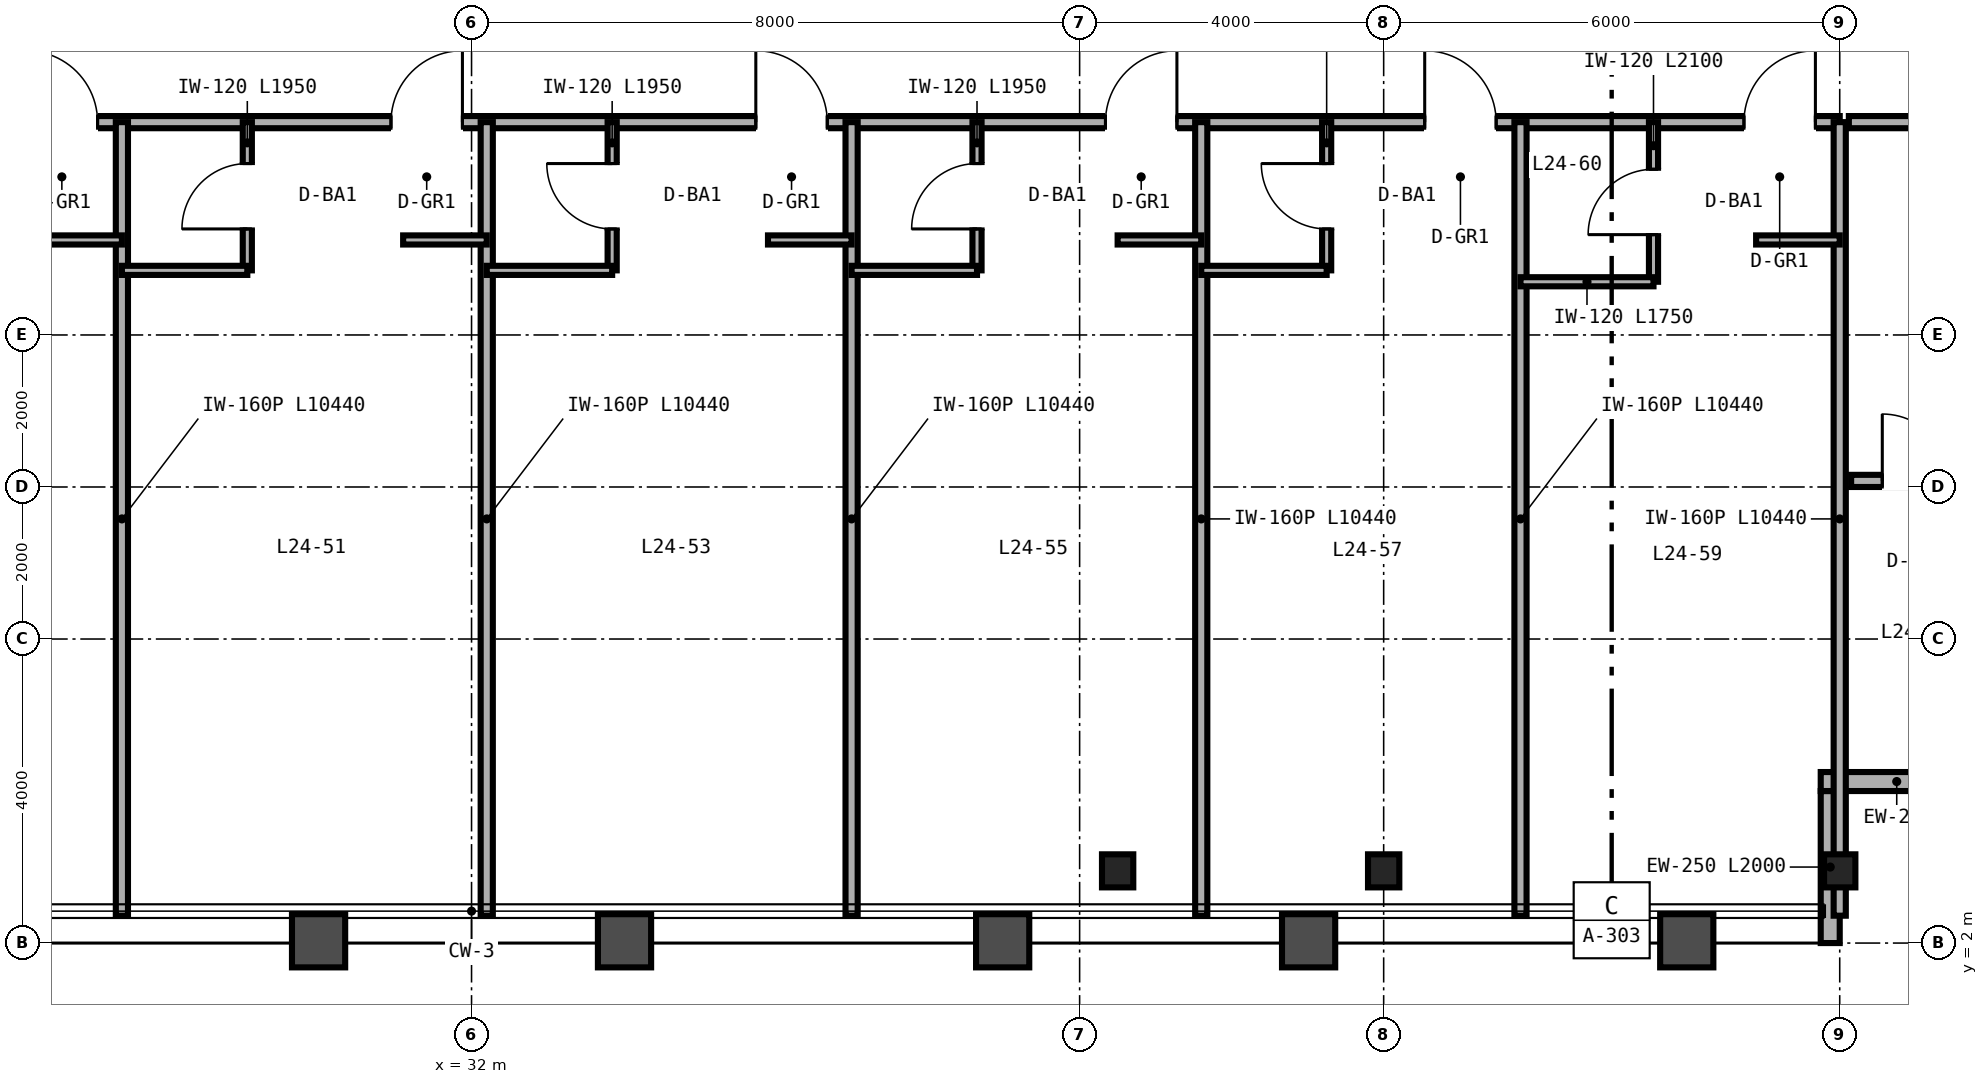
"""IFC4 building model, lengths in metres.
Left out: names, types, materials, properties, quantities, classifications, styles, units other than length and angle.
Written with IfcOpenShell. Run it as: python <this file> out.ifc"""

import sys

from ifc_helpers import new_model, si_unit, direction, frame, frame_2d, origin, origin_2d, place, context, subcontext, project, spatial, rectangle, i_section, extrude, source, transform, mapped, element, fill, save


model = new_model("IFC4")
c1 = context("Model", 3, precision=1e-05, world=origin(), true_north=direction((0.0, 1.0)))
c2 = subcontext(c1, "Body", "Model", "MODEL_VIEW")
j1 = project(units=[si_unit("LENGTHUNIT", "METRE"), si_unit("PLANEANGLEUNIT", "RADIAN")], contexts=[c1])
p1 = place(None, origin())
s1 = spatial("IfcSite", under=j1, at=p1, CompositionType="ELEMENT")
p2 = place(p1, origin())
s2 = spatial("IfcBuilding", under=s1, at=p2, CompositionType="ELEMENT")
p3 = place(p2, frame((0.0, 0.0, 100.8)))
s3 = spatial("IfcBuildingStorey", under=s2, at=p3, CompositionType="ELEMENT", Elevation=100.8)
m1 = source(origin(), c2, "Body", "SweptSolid", [
    extrude(i_section(OverallWidth=0.412, OverallDepth=0.435, WebThickness=0.036, FlangeThickness=0.057, FilletRadius=0.025, at=origin_2d()), origin(), (0.0, 0.0, 1.0), 3.36),
])
for number, where, z_axis, x_axis in (
    (1, (40.5, 2.95, 0.0), (0.0, 0.0, 1.0), (1.0, 0.0, 0.0)),
    (2, (44.0, 2.95, 0.0), (0.0, 0.0, 1.0), (1.0, 0.0, 0.0)),
    (3, (50.0, 2.95, 0.0), (0.0, 0.0, 1.0), (1.0, 0.0, 0.0)),
):
    element("IfcColumn", number, at=place(p3, frame(where, z_axis=z_axis, x_axis=x_axis)), inside=s3, PredefinedType="COLUMN", context=c2, shape_type="MappedRepresentation", body=[
        mapped(m1, transform((0.0, 0.0, 0.0), scale=1.0)),
    ])
p4 = place(p3, frame((49.875, 2.0, 0.0), z_axis=(0.0, 0.0, 1.0), x_axis=(0.0, 1.0, 0.0)))
e4 = element("IfcWall", 4, at=p4, inside=s3, PredefinedType="SOLIDWALL", context=c2, shape_type="SweptSolid", body=[
    extrude(rectangle(XDim=2.0, YDim=0.25, at=frame_2d((1.0, 0.0))), origin(), (0.0, 0.0, 1.0), 2.667),
])
p5 = place(p3, frame((49.75, 4.125, 0.0), z_axis=(0.0, 0.0, 1.0), x_axis=(1.0, 0.0, 0.0)))
e5 = element("IfcWall", 5, at=p5, inside=s3, PredefinedType="SOLIDWALL", context=c2, shape_type="SweptSolid", body=[
    extrude(rectangle(XDim=2.0, YDim=0.25, at=frame_2d((1.0, 0.0))), origin(), (0.0, 0.0, 1.0), 3.36),
])
p6 = place(p3, frame((50.12, 12.8, 0.0), z_axis=(0.0, 0.0, 1.0), x_axis=(1.0, 0.0, 0.0)))
e6 = element("IfcWall", 6, at=p6, inside=s3, PredefinedType="PARTITIONING", context=c2, shape_type="SweptSolid", body=[
    extrude(rectangle(XDim=5.68, YDim=0.16, at=frame_2d((2.84, 0.0))), origin(), (0.0, 0.0, 1.0), 3.36),
])
p7 = place(p6, frame((2.36, 0.0, 0.0)))
e7 = element("IfcOpeningElement", 7, at=p7, cuts=e6, PredefinedType="OPENING", context=c2, shape_type="SweptSolid", body=[
    extrude(rectangle(XDim=0.96, YDim=2.15, at=frame_2d((0.48, 1.075))), frame((0.0, 0.09, 0.0), z_axis=(0.0, -1.0, 0.0), x_axis=(1.0, 0.0, 0.0)), (0.0, 0.0, 1.0), 0.18),
])
p8 = place(p3, frame((50.15, 8.08, 0.0), z_axis=(0.0, 0.0, 1.0), x_axis=(1.0, 0.0, 0.0)))
e8 = element("IfcWall", 8, at=p8, inside=s3, PredefinedType="PARTITIONING", context=c2, shape_type="SweptSolid", body=[
    extrude(rectangle(XDim=1.7, YDim=0.16, at=frame_2d((0.85, 0.0))), origin(), (0.0, 0.0, 1.0), 3.36),
])
p9 = place(p8, frame((0.41, 0.0, 0.0)))
e9 = element("IfcOpeningElement", 9, at=p9, cuts=e8, PredefinedType="OPENING", context=c2, shape_type="SweptSolid", body=[
    extrude(rectangle(XDim=0.88, YDim=2.15, at=frame_2d((0.44, 1.075))), frame((0.0, 0.09, 0.0), z_axis=(0.0, -1.0, 0.0), x_axis=(1.0, 0.0, 0.0)), (0.0, 0.0, 1.0), 0.18),
])
p10 = place(p3, frame((14.0, 12.8, 0.0), z_axis=(0.0, 0.0, 1.0), x_axis=(1.0, 0.0, 0.0)))
e10 = element("IfcWall", 10, at=p10, inside=s3, PredefinedType="PARTITIONING", context=c2, shape_type="SweptSolid", body=[
    extrude(rectangle(XDim=36.0, YDim=0.16, at=frame_2d((18.0, 0.0))), origin(), (0.0, 0.0, 1.0), 2.581),
])
p11 = place(p10, frame((3.14, 0.0, 0.0)))
e11 = element("IfcOpeningElement", 11, at=p11, cuts=e10, PredefinedType="OPENING", context=c2, shape_type="SweptSolid", body=[
    extrude(rectangle(XDim=0.94, YDim=2.15, at=frame_2d((0.47, 1.075))), frame((0.0, 0.09, 0.0), z_axis=(0.0, -1.0, 0.0), x_axis=(1.0, 0.0, 0.0)), (0.0, 0.0, 1.0), 0.18),
])
p12 = place(p10, frame((7.54, 0.0, 0.0)))
e12 = element("IfcOpeningElement", 12, at=p12, cuts=e10, PredefinedType="OPENING", context=c2, shape_type="SweptSolid", body=[
    extrude(rectangle(XDim=0.94, YDim=2.15, at=frame_2d((0.47, 1.075))), frame((0.0, 0.09, 0.0), z_axis=(0.0, -1.0, 0.0), x_axis=(1.0, 0.0, 0.0)), (0.0, 0.0, 1.0), 0.18),
])
p13 = place(p10, frame((12.14, 0.0, 0.0)))
e13 = element("IfcOpeningElement", 13, at=p13, cuts=e10, PredefinedType="OPENING", context=c2, shape_type="SweptSolid", body=[
    extrude(rectangle(XDim=0.94, YDim=2.15, at=frame_2d((0.47, 1.075))), frame((0.0, 0.09, 0.0), z_axis=(0.0, -1.0, 0.0), x_axis=(1.0, 0.0, 0.0)), (0.0, 0.0, 1.0), 0.18),
])
p14 = place(p10, frame((16.94, 0.0, 0.0)))
e14 = element("IfcOpeningElement", 14, at=p14, cuts=e10, PredefinedType="OPENING", context=c2, shape_type="SweptSolid", body=[
    extrude(rectangle(XDim=0.94, YDim=2.15, at=frame_2d((0.47, 1.075))), frame((0.0, 0.09, 0.0), z_axis=(0.0, -1.0, 0.0), x_axis=(1.0, 0.0, 0.0)), (0.0, 0.0, 1.0), 0.18),
])
p15 = place(p10, frame((21.74, 0.0, 0.0)))
e15 = element("IfcOpeningElement", 15, at=p15, cuts=e10, PredefinedType="OPENING", context=c2, shape_type="SweptSolid", body=[
    extrude(rectangle(XDim=0.94, YDim=2.15, at=frame_2d((0.47, 1.075))), frame((0.0, 0.09, 0.0), z_axis=(0.0, -1.0, 0.0), x_axis=(1.0, 0.0, 0.0)), (0.0, 0.0, 1.0), 0.18),
])
p16 = place(p10, frame((26.34, 0.0, 0.0)))
e16 = element("IfcOpeningElement", 16, at=p16, cuts=e10, PredefinedType="OPENING", context=c2, shape_type="SweptSolid", body=[
    extrude(rectangle(XDim=0.94, YDim=2.15, at=frame_2d((0.47, 1.075))), frame((0.0, 0.09, 0.0), z_axis=(0.0, -1.0, 0.0), x_axis=(1.0, 0.0, 0.0)), (0.0, 0.0, 1.0), 0.18),
])
p17 = place(p10, frame((30.54, 0.0, 0.0)))
e17 = element("IfcOpeningElement", 17, at=p17, cuts=e10, PredefinedType="OPENING", context=c2, shape_type="SweptSolid", body=[
    extrude(rectangle(XDim=0.94, YDim=2.15, at=frame_2d((0.47, 1.075))), frame((0.0, 0.09, 0.0), z_axis=(0.0, -1.0, 0.0), x_axis=(1.0, 0.0, 0.0)), (0.0, 0.0, 1.0), 0.18),
])
p18 = place(p10, frame((34.74, 0.0, 0.0)))
e18 = element("IfcOpeningElement", 18, at=p18, cuts=e10, PredefinedType="OPENING", context=c2, shape_type="SweptSolid", body=[
    extrude(rectangle(XDim=0.94, YDim=2.15, at=frame_2d((0.47, 1.075))), frame((0.0, 0.09, 0.0), z_axis=(0.0, -1.0, 0.0), x_axis=(1.0, 0.0, 0.0)), (0.0, 0.0, 1.0), 0.18),
])
p19 = place(p3, frame((50.0, 2.36, 0.0), z_axis=(0.0, 0.0, 1.0), x_axis=(0.0, 1.0, 0.0)))
e19 = element("IfcWall", 19, at=p19, inside=s3, PredefinedType="PARTITIONING", context=c2, shape_type="SweptSolid", body=[
    extrude(rectangle(XDim=10.44, YDim=0.16, at=frame_2d((5.22, 0.0))), origin(), (0.0, 0.0, 1.0), 2.667),
])
p20 = place(p3, frame((27.4, 2.36, 0.0), z_axis=(0.0, 0.0, 1.0), x_axis=(0.0, 1.0, 0.0)))
e20 = element("IfcWall", 20, at=p20, inside=s3, PredefinedType="PARTITIONING", context=c2, shape_type="SweptSolid", body=[
    extrude(rectangle(XDim=10.44, YDim=0.16, at=frame_2d((5.22, 0.0))), origin(), (0.0, 0.0, 1.0), 2.433),
])
p21 = place(p3, frame((26.3, 11.25, 0.0), z_axis=(0.0, 0.0, 1.0), x_axis=(1.0, 0.0, 0.0)))
e21 = element("IfcWall", 21, at=p21, inside=s3, PredefinedType="PARTITIONING", context=c2, shape_type="SweptSolid", body=[
    extrude(rectangle(XDim=1.1, YDim=0.12, at=frame_2d((0.55, 0.0))), origin(), (0.0, 0.0, 1.0), 3.36),
])
p22 = place(p3, frame((32.2, 2.36, 0.0), z_axis=(0.0, 0.0, 1.0), x_axis=(0.0, 1.0, 0.0)))
e22 = element("IfcWall", 22, at=p22, inside=s3, PredefinedType="PARTITIONING", context=c2, shape_type="SweptSolid", body=[
    extrude(rectangle(XDim=10.44, YDim=0.16, at=frame_2d((5.22, 0.0))), origin(), (0.0, 0.0, 1.0), 2.433),
])
p23 = place(p3, frame((29.05, 10.85, 0.0), z_axis=(0.0, 0.0, 1.0), x_axis=(0.0, 1.0, 0.0)))
e23 = element("IfcWall", 23, at=p23, inside=s3, PredefinedType="PARTITIONING", context=c2, shape_type="SweptSolid", body=[
    extrude(rectangle(XDim=1.95, YDim=0.12, at=frame_2d((0.975, 0.0))), origin(), (0.0, 0.0, 1.0), 3.36),
])
p24 = place(p23, frame((0.545, 0.0, 0.0)))
e24 = element("IfcOpeningElement", 24, at=p24, cuts=e23, PredefinedType="OPENING", context=c2, shape_type="SweptSolid", body=[
    extrude(rectangle(XDim=0.86, YDim=2.1, at=frame_2d((0.43, 1.05))), frame((0.0, 0.07, 0.0), z_axis=(0.0, -1.0, 0.0), x_axis=(1.0, 0.0, 0.0)), (0.0, 0.0, 1.0), 0.14),
])
p25 = place(p3, frame((27.4, 10.85, 0.0), z_axis=(0.0, 0.0, 1.0), x_axis=(1.0, 0.0, 0.0)))
e25 = element("IfcWall", 25, at=p25, inside=s3, PredefinedType="PARTITIONING", context=c2, shape_type="SweptSolid", body=[
    extrude(rectangle(XDim=1.65, YDim=0.12, at=frame_2d((0.825, 0.0))), origin(), (0.0, 0.0, 1.0), 3.36),
])
p26 = place(p3, frame((31.1, 11.25, 0.0), z_axis=(0.0, 0.0, 1.0), x_axis=(1.0, 0.0, 0.0)))
e26 = element("IfcWall", 26, at=p26, inside=s3, PredefinedType="PARTITIONING", context=c2, shape_type="SweptSolid", body=[
    extrude(rectangle(XDim=1.1, YDim=0.12, at=frame_2d((0.55, 0.0))), origin(), (0.0, 0.0, 1.0), 3.36),
])
p27 = place(p3, frame((37.0, 2.36, 0.0), z_axis=(0.0, 0.0, 1.0), x_axis=(0.0, 1.0, 0.0)))
e27 = element("IfcWall", 27, at=p27, inside=s3, PredefinedType="PARTITIONING", context=c2, shape_type="SweptSolid", body=[
    extrude(rectangle(XDim=10.44, YDim=0.16, at=frame_2d((5.22, 0.0))), origin(), (0.0, 0.0, 1.0), 2.433),
])
p28 = place(p3, frame((33.85, 10.85, 0.0), z_axis=(0.0, 0.0, 1.0), x_axis=(0.0, 1.0, 0.0)))
e28 = element("IfcWall", 28, at=p28, inside=s3, PredefinedType="PARTITIONING", context=c2, shape_type="SweptSolid", body=[
    extrude(rectangle(XDim=1.95, YDim=0.12, at=frame_2d((0.975, 0.0))), origin(), (0.0, 0.0, 1.0), 3.36),
])
p29 = place(p28, frame((0.545, 0.0, 0.0)))
e29 = element("IfcOpeningElement", 29, at=p29, cuts=e28, PredefinedType="OPENING", context=c2, shape_type="SweptSolid", body=[
    extrude(rectangle(XDim=0.86, YDim=2.1, at=frame_2d((0.43, 1.05))), frame((0.0, 0.07, 0.0), z_axis=(0.0, -1.0, 0.0), x_axis=(1.0, 0.0, 0.0)), (0.0, 0.0, 1.0), 0.14),
])
p30 = place(p3, frame((32.2, 10.85, 0.0), z_axis=(0.0, 0.0, 1.0), x_axis=(1.0, 0.0, 0.0)))
e30 = element("IfcWall", 30, at=p30, inside=s3, PredefinedType="PARTITIONING", context=c2, shape_type="SweptSolid", body=[
    extrude(rectangle(XDim=1.65, YDim=0.12, at=frame_2d((0.825, 0.0))), origin(), (0.0, 0.0, 1.0), 3.36),
])
p31 = place(p3, frame((35.9, 11.25, 0.0), z_axis=(0.0, 0.0, 1.0), x_axis=(1.0, 0.0, 0.0)))
e31 = element("IfcWall", 31, at=p31, inside=s3, PredefinedType="PARTITIONING", context=c2, shape_type="SweptSolid", body=[
    extrude(rectangle(XDim=1.1, YDim=0.12, at=frame_2d((0.55, 0.0))), origin(), (0.0, 0.0, 1.0), 3.36),
])
p32 = place(p3, frame((41.6, 2.36, 0.0), z_axis=(0.0, 0.0, 1.0), x_axis=(0.0, 1.0, 0.0)))
e32 = element("IfcWall", 32, at=p32, inside=s3, PredefinedType="PARTITIONING", context=c2, shape_type="SweptSolid", body=[
    extrude(rectangle(XDim=10.44, YDim=0.16, at=frame_2d((5.22, 0.0))), origin(), (0.0, 0.0, 1.0), 2.823),
])
p33 = place(p3, frame((38.65, 10.85, 0.0), z_axis=(0.0, 0.0, 1.0), x_axis=(0.0, 1.0, 0.0)))
e33 = element("IfcWall", 33, at=p33, inside=s3, PredefinedType="PARTITIONING", context=c2, shape_type="SweptSolid", body=[
    extrude(rectangle(XDim=1.95, YDim=0.12, at=frame_2d((0.975, 0.0))), origin(), (0.0, 0.0, 1.0), 3.36),
])
p34 = place(p33, frame((0.545, 0.0, 0.0)))
e34 = element("IfcOpeningElement", 34, at=p34, cuts=e33, PredefinedType="OPENING", context=c2, shape_type="SweptSolid", body=[
    extrude(rectangle(XDim=0.86, YDim=2.1, at=frame_2d((0.43, 1.05))), frame((0.0, 0.07, 0.0), z_axis=(0.0, -1.0, 0.0), x_axis=(1.0, 0.0, 0.0)), (0.0, 0.0, 1.0), 0.14),
])
p35 = place(p3, frame((37.0, 10.85, 0.0), z_axis=(0.0, 0.0, 1.0), x_axis=(1.0, 0.0, 0.0)))
e35 = element("IfcWall", 35, at=p35, inside=s3, PredefinedType="PARTITIONING", context=c2, shape_type="SweptSolid", body=[
    extrude(rectangle(XDim=1.65, YDim=0.12, at=frame_2d((0.825, 0.0))), origin(), (0.0, 0.0, 1.0), 3.36),
])
p36 = place(p3, frame((40.5, 11.25, 0.0), z_axis=(0.0, 0.0, 1.0), x_axis=(1.0, 0.0, 0.0)))
e36 = element("IfcWall", 36, at=p36, inside=s3, PredefinedType="PARTITIONING", context=c2, shape_type="SweptSolid", body=[
    extrude(rectangle(XDim=1.1, YDim=0.12, at=frame_2d((0.55, 0.0))), origin(), (0.0, 0.0, 1.0), 2.581),
])
p37 = place(p3, frame((45.8, 2.36, 0.0), z_axis=(0.0, 0.0, 1.0), x_axis=(0.0, 1.0, 0.0)))
e37 = element("IfcWall", 37, at=p37, inside=s3, PredefinedType="PARTITIONING", context=c2, shape_type="SweptSolid", body=[
    extrude(rectangle(XDim=10.44, YDim=0.16, at=frame_2d((5.22, 0.0))), origin(), (0.0, 0.0, 1.0), 2.667),
])
p38 = place(p3, frame((43.25, 10.85, 0.0), z_axis=(0.0, 0.0, 1.0), x_axis=(0.0, 1.0, 0.0)))
e38 = element("IfcWall", 38, at=p38, inside=s3, PredefinedType="PARTITIONING", context=c2, shape_type="SweptSolid", body=[
    extrude(rectangle(XDim=1.95, YDim=0.12, at=frame_2d((0.975, 0.0))), origin(), (0.0, 0.0, 1.0), 3.36),
])
p39 = place(p38, frame((0.545, 0.0, 0.0)))
e39 = element("IfcOpeningElement", 39, at=p39, cuts=e38, PredefinedType="OPENING", context=c2, shape_type="SweptSolid", body=[
    extrude(rectangle(XDim=0.86, YDim=2.1, at=frame_2d((0.43, 1.05))), frame((0.0, 0.07, 0.0), z_axis=(0.0, -1.0, 0.0), x_axis=(1.0, 0.0, 0.0)), (0.0, 0.0, 1.0), 0.14),
])
p40 = place(p3, frame((41.6, 10.85, 0.0), z_axis=(0.0, 0.0, 1.0), x_axis=(1.0, 0.0, 0.0)))
e40 = element("IfcWall", 40, at=p40, inside=s3, PredefinedType="PARTITIONING", context=c2, shape_type="SweptSolid", body=[
    extrude(rectangle(XDim=1.65, YDim=0.12, at=frame_2d((0.825, 0.0))), origin(), (0.0, 0.0, 1.0), 3.36),
])
p41 = place(p3, frame((47.55, 10.7, 0.0), z_axis=(0.0, 0.0, 1.0), x_axis=(0.0, 1.0, 0.0)))
e41 = element("IfcWall", 41, at=p41, inside=s3, PredefinedType="PARTITIONING", context=c2, shape_type="SweptSolid", body=[
    extrude(rectangle(XDim=2.1, YDim=0.12, at=frame_2d((1.05, 0.0))), origin(), (0.0, 0.0, 1.0), 3.36),
])
p42 = place(p41, frame((0.62, 0.0, 0.0)))
e42 = element("IfcOpeningElement", 42, at=p42, cuts=e41, PredefinedType="OPENING", context=c2, shape_type="SweptSolid", body=[
    extrude(rectangle(XDim=0.86, YDim=2.1, at=frame_2d((0.43, 1.05))), frame((0.0, 0.07, 0.0), z_axis=(0.0, -1.0, 0.0), x_axis=(1.0, 0.0, 0.0)), (0.0, 0.0, 1.0), 0.14),
])
p43 = place(p3, frame((45.8, 10.7, 0.0), z_axis=(0.0, 0.0, 1.0), x_axis=(1.0, 0.0, 0.0)))
e43 = element("IfcWall", 43, at=p43, inside=s3, PredefinedType="PARTITIONING", context=c2, shape_type="SweptSolid", body=[
    extrude(rectangle(XDim=1.75, YDim=0.12, at=frame_2d((0.875, 0.0))), origin(), (0.0, 0.0, 1.0), 3.36),
])
p44 = place(p3, frame((48.9, 11.25, 0.0), z_axis=(0.0, 0.0, 1.0), x_axis=(1.0, 0.0, 0.0)))
e44 = element("IfcWall", 44, at=p44, inside=s3, PredefinedType="PARTITIONING", context=c2, shape_type="SweptSolid", body=[
    extrude(rectangle(XDim=1.1, YDim=0.12, at=frame_2d((0.55, 0.0))), origin(), (0.0, 0.0, 1.0), 3.36),
])
m2 = source(origin(), c2, "Body", "SweptSolid", [
    extrude(rectangle(XDim=0.88, YDim=2.15, at=frame_2d((0.44, 1.075))), frame((0.0, 0.025, 0.0), z_axis=(0.0, -1.0, 0.0), x_axis=(1.0, 0.0, 0.0)), (0.0, 0.0, 1.0), 0.05),
])
p45 = place(p9, origin())
e45 = element("IfcDoor", 45, at=p45, inside=s3, OperationType="SINGLE_SWING_LEFT", PredefinedType="DOOR", context=c2, shape_type="MappedRepresentation", body=[
    mapped(m2, transform((0.0, 0.0, 0.0), scale=1.0)),
])
fill(e9, e45)
m3 = source(origin(), c2, "Body", "SweptSolid", [
    extrude(rectangle(XDim=0.86, YDim=2.1, at=frame_2d((0.43, 1.05))), frame((0.0, 0.025, 0.0), z_axis=(0.0, -1.0, 0.0), x_axis=(1.0, 0.0, 0.0)), (0.0, 0.0, 1.0), 0.05),
])
p46 = place(p24, origin())
e46 = element("IfcDoor", 46, at=p46, inside=s3, OperationType="SINGLE_SWING_LEFT", PredefinedType="DOOR", context=c2, shape_type="MappedRepresentation", body=[
    mapped(m3, transform((0.0, 0.0, 0.0), scale=1.0)),
])
fill(e24, e46)
p47 = place(p29, origin())
e47 = element("IfcDoor", 47, at=p47, inside=s3, OperationType="SINGLE_SWING_RIGHT", PredefinedType="DOOR", context=c2, shape_type="MappedRepresentation", body=[
    mapped(m3, transform((0.0, 0.0, 0.0), scale=1.0)),
])
fill(e29, e47)
p48 = place(p34, origin())
e48 = element("IfcDoor", 48, at=p48, inside=s3, OperationType="SINGLE_SWING_LEFT", PredefinedType="DOOR", context=c2, shape_type="MappedRepresentation", body=[
    mapped(m3, transform((0.0, 0.0, 0.0), scale=1.0)),
])
fill(e34, e48)
p49 = place(p39, origin())
e49 = element("IfcDoor", 49, at=p49, inside=s3, OperationType="SINGLE_SWING_RIGHT", PredefinedType="DOOR", context=c2, shape_type="MappedRepresentation", body=[
    mapped(m3, transform((0.0, 0.0, 0.0), scale=1.0)),
])
fill(e39, e49)
p50 = place(p42, origin())
e50 = element("IfcDoor", 50, at=p50, inside=s3, OperationType="SINGLE_SWING_LEFT", PredefinedType="DOOR", context=c2, shape_type="MappedRepresentation", body=[
    mapped(m3, transform((0.0, 0.0, 0.0), scale=1.0)),
])
fill(e42, e50)
m4 = source(origin(), c2, "Body", "SweptSolid", [
    extrude(rectangle(XDim=0.94, YDim=2.15, at=frame_2d((0.47, 1.075))), frame((0.0, 0.025, 0.0), z_axis=(0.0, -1.0, 0.0), x_axis=(1.0, 0.0, 0.0)), (0.0, 0.0, 1.0), 0.05),
])
p51 = place(p13, origin())
e51 = element("IfcDoor", 51, at=p51, inside=s3, OperationType="SINGLE_SWING_LEFT", PredefinedType="DOOR", context=c2, shape_type="MappedRepresentation", body=[
    mapped(m4, transform((0.0, 0.0, 0.0), scale=1.0)),
])
fill(e13, e51)
p52 = place(p14, origin())
e52 = element("IfcDoor", 52, at=p52, inside=s3, OperationType="SINGLE_SWING_RIGHT", PredefinedType="DOOR", context=c2, shape_type="MappedRepresentation", body=[
    mapped(m4, transform((0.0, 0.0, 0.0), scale=1.0)),
])
fill(e14, e52)
p53 = place(p15, origin())
e53 = element("IfcDoor", 53, at=p53, inside=s3, OperationType="SINGLE_SWING_LEFT", PredefinedType="DOOR", context=c2, shape_type="MappedRepresentation", body=[
    mapped(m4, transform((0.0, 0.0, 0.0), scale=1.0)),
])
fill(e15, e53)
p54 = place(p16, origin())
e54 = element("IfcDoor", 54, at=p54, inside=s3, OperationType="SINGLE_SWING_RIGHT", PredefinedType="DOOR", context=c2, shape_type="MappedRepresentation", body=[
    mapped(m4, transform((0.0, 0.0, 0.0), scale=1.0)),
])
fill(e16, e54)
p55 = place(p17, origin())
e55 = element("IfcDoor", 55, at=p55, inside=s3, OperationType="SINGLE_SWING_LEFT", PredefinedType="DOOR", context=c2, shape_type="MappedRepresentation", body=[
    mapped(m4, transform((0.0, 0.0, 0.0), scale=1.0)),
])
fill(e17, e55)
p56 = place(p18, origin())
e56 = element("IfcDoor", 56, at=p56, inside=s3, OperationType="SINGLE_SWING_RIGHT", PredefinedType="DOOR", context=c2, shape_type="MappedRepresentation", body=[
    mapped(m4, transform((0.0, 0.0, 0.0), scale=1.0)),
])
fill(e18, e56)
save(model, sys.argv[1])
